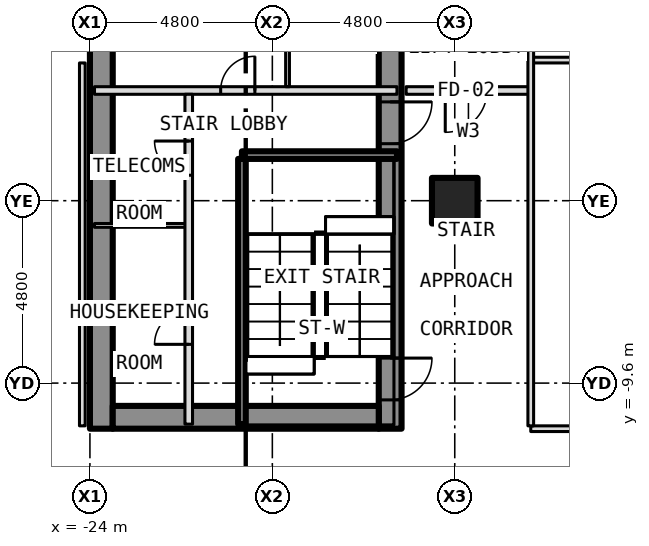
"""IFC4 building model, lengths in metres.
Left out: names, types, materials, properties, quantities, classifications, styles, units other than length and angle.
Written with IfcOpenShell. Run it as: python <this file> out.ifc"""

import sys

from ifc_helpers import new_model, si_unit, direction, frame, frame_2d, origin, origin_2d, place, context, subcontext, project, spatial, rectangle, hollow_rectangle, extrude, element, fill, save


model = new_model("IFC4")
c1 = context("Model", 3, precision=1e-05, world=origin(), true_north=direction((0.0, 1.0)))
c2 = subcontext(c1, "Body", "Model", "MODEL_VIEW")
j1 = project(units=[si_unit("LENGTHUNIT", "METRE"), si_unit("PLANEANGLEUNIT", "RADIAN")], contexts=[c1])
p1 = place(None, origin())
s1 = spatial("IfcSite", under=j1, at=p1, CompositionType="ELEMENT")
p2 = place(p1, origin())
s2 = spatial("IfcBuilding", under=s1, at=p2, CompositionType="ELEMENT")
p3 = place(p2, frame((0.0, 0.0, -10.0)))
s3 = spatial("IfcBuildingStorey", under=s2, at=p3, CompositionType="ELEMENT", Elevation=-10.0)
p4 = place(p3, frame((-14.4, -4.8, -0.6), z_axis=(0.0, 0.0, 1.0), x_axis=(1.0, 0.0, 0.0)))
e1 = element("IfcColumn", 1, at=p4, inside=s3, PredefinedType="COLUMN", context=c2, shape_type="SweptSolid", body=[
    extrude(hollow_rectangle(XDim=1.2, YDim=1.2, WallThickness=0.07, at=origin_2d()), origin(), (0.0, 0.0, 1.0), 5.3),
])
p5 = place(p3, frame((-16.1, -10.8, 0.0), z_axis=(0.0, 0.0, 1.0), x_axis=(0.0, 1.0, 0.0)))
e2 = element("IfcWall", 2, at=p5, inside=s3, PredefinedType="SHEAR", context=c2, shape_type="SweptSolid", body=[
    extrude(rectangle(XDim=21.6, YDim=0.6, at=frame_2d((10.8, 0.0))), origin(), (0.0, 0.0, 1.0), 4.7),
])
p6 = place(p5, frame((11.5, 0.0, 0.0)))
e3 = element("IfcOpeningElement", 3, at=p6, cuts=e2, PredefinedType="OPENING", context=c2, shape_type="SweptSolid", body=[
    extrude(rectangle(XDim=1.1, YDim=2.1, at=frame_2d((0.55, 1.05))), frame((0.0, 0.312, 0.0), z_axis=(0.0, -1.0, 0.0), x_axis=(1.0, 0.0, 0.0)), (0.0, 0.0, 1.0), 0.624),
])
p7 = place(p5, frame((0.758, 0.0, 0.0)))
e4 = element("IfcOpeningElement", 4, at=p7, cuts=e2, PredefinedType="OPENING", context=c2, shape_type="SweptSolid", body=[
    extrude(rectangle(XDim=1.1, YDim=2.1, at=frame_2d((0.55, 1.05))), frame((0.0, 0.312, 0.0), z_axis=(0.0, -1.0, 0.0), x_axis=(1.0, 0.0, 0.0)), (0.0, 0.0, 1.0), 0.624),
])
p8 = place(p5, frame((7.5, 0.0, 0.0)))
e5 = element("IfcOpeningElement", 5, at=p8, cuts=e2, PredefinedType="OPENING", context=c2, shape_type="SweptSolid", body=[
    extrude(rectangle(XDim=1.1, YDim=2.1, at=frame_2d((0.55, 1.05))), frame((0.0, 0.312, 0.0), z_axis=(0.0, -1.0, 0.0), x_axis=(1.0, 0.0, 0.0)), (0.0, 0.0, 1.0), 0.624),
])
p9 = place(p3, frame((-23.7, -10.8, 0.0), z_axis=(0.0, 0.0, 1.0), x_axis=(0.0, 1.0, 0.0)))
e6 = element("IfcWall", 6, at=p9, inside=s3, PredefinedType="SHEAR", context=c2, shape_type="SweptSolid", body=[
    extrude(rectangle(XDim=21.6, YDim=0.6, at=frame_2d((10.8, 0.0))), origin(), (0.0, 0.0, 1.0), 4.7),
])
p10 = place(p3, frame((-23.4, -10.5, 0.0), z_axis=(0.0, 0.0, 1.0), x_axis=(1.0, 0.0, 0.0)))
e7 = element("IfcWall", 7, at=p10, inside=s3, PredefinedType="SHEAR", context=c2, shape_type="SweptSolid", body=[
    extrude(rectangle(XDim=7.0, YDim=0.6, at=frame_2d((3.5, 0.0))), origin(), (0.0, 0.0, 1.0), 4.7),
])
p11 = place(p3, frame((-12.4, -10.8, 0.0), z_axis=(0.0, 0.0, 1.0), x_axis=(1.0, 0.0, 0.0)))
e8 = element("IfcWall", 8, at=p11, inside=s3, PredefinedType="PARTITIONING", context=c2, shape_type="SweptSolid", body=[
    extrude(rectangle(XDim=24.8, YDim=0.15, at=frame_2d((12.4, 0.0))), origin(), (0.0, 0.0, 1.0), 4.7),
])
p12 = place(p11, frame((5.75, 0.0, 0.0)))
e9 = element("IfcOpeningElement", 9, at=p12, cuts=e8, PredefinedType="OPENING", context=c2, shape_type="SweptSolid", body=[
    extrude(rectangle(XDim=0.9, YDim=2.1, at=frame_2d((0.45, 1.05))), frame((0.0, 0.087, 0.0), z_axis=(0.0, -1.0, 0.0), x_axis=(1.0, 0.0, 0.0)), (0.0, 0.0, 1.0), 0.174),
])
p13 = place(p11, frame((18.15, 0.0, 0.0)))
e10 = element("IfcOpeningElement", 10, at=p13, cuts=e8, PredefinedType="OPENING", context=c2, shape_type="SweptSolid", body=[
    extrude(rectangle(XDim=0.9, YDim=2.1, at=frame_2d((0.45, 1.05))), frame((0.0, 0.087, 0.0), z_axis=(0.0, -1.0, 0.0), x_axis=(1.0, 0.0, 0.0)), (0.0, 0.0, 1.0), 0.174),
])
p14 = place(p3, frame((-23.88, -5.45, 0.0), z_axis=(0.0, 0.0, 1.0), x_axis=(1.0, 0.0, 0.0)))
e11 = element("IfcWall", 11, at=p14, inside=s3, PredefinedType="PARTITIONING", context=c2, shape_type="SweptSolid", body=[
    extrude(rectangle(XDim=2.48, YDim=0.1, at=frame_2d((1.24, 0.0))), origin(), (0.0, 0.0, 1.0), 4.7),
])
p15 = place(p3, frame((-20.0, -3.6, 0.0), z_axis=(0.0, 0.0, 1.0), x_axis=(1.0, 0.0, 0.0)))
e12 = element("IfcWall", 12, at=p15, inside=s3, PredefinedType="SHEAR", context=c2, shape_type="SweptSolid", body=[
    extrude(rectangle(XDim=4.08, YDim=0.2, at=frame_2d((2.04, 0.0))), origin(), (0.0, 0.0, 1.0), 4.7),
])
p16 = place(p3, frame((-23.88, -1.9, 0.0), z_axis=(0.0, 0.0, 1.0), x_axis=(1.0, 0.0, 0.0)))
e13 = element("IfcWall", 13, at=p16, inside=s3, PredefinedType="PARTITIONING", context=c2, shape_type="SweptSolid", body=[
    extrude(rectangle(XDim=7.96, YDim=0.2, at=frame_2d((3.98, 0.0))), origin(), (0.0, 0.0, 1.0), 4.7),
])
p17 = place(p16, frame((3.32, 0.0, 0.0)))
e14 = element("IfcOpeningElement", 14, at=p17, cuts=e13, PredefinedType="OPENING", context=c2, shape_type="SweptSolid", body=[
    extrude(rectangle(XDim=0.9, YDim=2.1, at=frame_2d((0.45, 1.05))), frame((0.0, 0.112, 0.0), z_axis=(0.0, -1.0, 0.0), x_axis=(1.0, 0.0, 0.0)), (0.0, 0.0, 1.0), 0.224),
])
p18 = place(p3, frame((-15.68, -1.9, 0.0), z_axis=(0.0, 0.0, 1.0), x_axis=(1.0, 0.0, 0.0)))
e15 = element("IfcWall", 15, at=p18, inside=s3, PredefinedType="PARTITIONING", context=c2, shape_type="SweptSolid", body=[
    extrude(rectangle(XDim=3.28, YDim=0.2, at=frame_2d((1.64, 0.0))), origin(), (0.0, 0.0, 1.0), 4.7),
])
p19 = place(p18, frame((1.03, 0.0, 0.0)))
e16 = element("IfcOpeningElement", 16, at=p19, cuts=e15, PredefinedType="OPENING", context=c2, shape_type="SweptSolid", body=[
    extrude(rectangle(XDim=1.1, YDim=2.1, at=frame_2d((0.55, 1.05))), frame((0.0, 0.112, 0.0), z_axis=(0.0, -1.0, 0.0), x_axis=(1.0, 0.0, 0.0)), (0.0, 0.0, 1.0), 0.224),
])
p20 = place(p3, frame((-12.4, -1.1, 0.0), z_axis=(0.0, 0.0, 1.0), x_axis=(1.0, 0.0, 0.0)))
e17 = element("IfcWall", 17, at=p20, inside=s3, PredefinedType="PARTITIONING", context=c2, shape_type="SweptSolid", body=[
    extrude(rectangle(XDim=24.8, YDim=0.15, at=frame_2d((12.4, 0.0))), origin(), (0.0, 0.0, 1.0), 4.7),
])
p21 = place(p3, frame((-24.2, -10.725, 0.0), z_axis=(0.0, 0.0, 1.0), x_axis=(0.0, 1.0, 0.0)))
e18 = element("IfcWall", 18, at=p21, inside=s3, PredefinedType="PARTITIONING", context=c2, shape_type="SweptSolid", body=[
    extrude(rectangle(XDim=9.55, YDim=0.15, at=frame_2d((4.775, 0.0))), origin(), (0.0, 0.0, 1.0), 4.7),
])
p22 = place(p3, frame((-21.4, -10.68, 0.0), z_axis=(0.0, 0.0, 1.0), x_axis=(0.0, 1.0, 0.0)))
e19 = element("IfcWall", 19, at=p22, inside=s3, PredefinedType="PARTITIONING", context=c2, shape_type="SweptSolid", body=[
    extrude(rectangle(XDim=8.68, YDim=0.2, at=frame_2d((4.34, 0.0))), origin(), (0.0, 0.0, 1.0), 4.7),
])
p23 = place(p22, frame((2.1, 0.0, 0.0)))
e20 = element("IfcOpeningElement", 20, at=p23, cuts=e19, PredefinedType="OPENING", context=c2, shape_type="SweptSolid", body=[
    extrude(rectangle(XDim=0.9, YDim=2.1, at=frame_2d((0.45, 1.05))), frame((0.0, 0.112, 0.0), z_axis=(0.0, -1.0, 0.0), x_axis=(1.0, 0.0, 0.0)), (0.0, 0.0, 1.0), 0.224),
])
p24 = place(p22, frame((6.55, 0.0, 0.0)))
e21 = element("IfcOpeningElement", 21, at=p24, cuts=e19, PredefinedType="OPENING", context=c2, shape_type="SweptSolid", body=[
    extrude(rectangle(XDim=0.9, YDim=2.1, at=frame_2d((0.45, 1.05))), frame((0.0, 0.112, 0.0), z_axis=(0.0, -1.0, 0.0), x_axis=(1.0, 0.0, 0.0)), (0.0, 0.0, 1.0), 0.224),
])
p25 = place(p3, frame((-20.0, -10.68, 0.0), z_axis=(0.0, 0.0, 1.0), x_axis=(0.0, 1.0, 0.0)))
e22 = element("IfcWall", 22, at=p25, inside=s3, PredefinedType="SHEAR", context=c2, shape_type="SweptSolid", body=[
    extrude(rectangle(XDim=6.98, YDim=0.2, at=frame_2d((3.49, 0.0))), origin(), (0.0, 0.0, 1.0), 4.7),
])
p26 = place(p3, frame((-18.8, -1.8, 0.0), z_axis=(0.0, 0.0, 1.0), x_axis=(0.0, 1.0, 0.0)))
e23 = element("IfcWall", 23, at=p26, inside=s3, PredefinedType="PARTITIONING", context=c2, shape_type="SweptSolid", body=[
    extrude(rectangle(XDim=12.48, YDim=0.1, at=frame_2d((6.24, 0.0))), origin(), (0.0, 0.0, 1.0), 4.7),
])
p27 = place(p3, frame((-12.4, -10.725, 0.0), z_axis=(0.0, 0.0, 1.0), x_axis=(0.0, 1.0, 0.0)))
e24 = element("IfcWall", 24, at=p27, inside=s3, PredefinedType="PARTITIONING", context=c2, shape_type="SweptSolid", body=[
    extrude(rectangle(XDim=12.925, YDim=0.15, at=frame_2d((6.462, 0.0))), origin(), (0.0, 0.0, 1.0), 4.7),
])
p28 = place(p27, frame((10.175, 0.0, 0.0)))
e25 = element("IfcOpeningElement", 25, at=p28, cuts=e24, PredefinedType="OPENING", context=c2, shape_type="SweptSolid", body=[
    extrude(rectangle(XDim=1.1, YDim=2.1, at=frame_2d((0.55, 1.05))), frame((0.0, 0.087, 0.0), z_axis=(0.0, -1.0, 0.0), x_axis=(1.0, 0.0, 0.0)), (0.0, 0.0, 1.0), 0.174),
])
p29 = place(p7, origin())
e26 = element("IfcDoor", 26, at=p29, inside=s3, OperationType="SINGLE_SWING_RIGHT", PredefinedType="DOOR", context=c2, shape_type="SweptSolid", body=[
    extrude(rectangle(XDim=1.1, YDim=2.1, at=frame_2d((0.55, 1.05))), frame((0.0, 0.025, 0.0), z_axis=(0.0, -1.0, 0.0), x_axis=(1.0, 0.0, 0.0)), (0.0, 0.0, 1.0), 0.05),
])
fill(e4, e26)
p30 = place(p8, origin())
e27 = element("IfcDoor", 27, at=p30, inside=s3, OperationType="SINGLE_SWING_RIGHT", PredefinedType="DOOR", context=c2, shape_type="SweptSolid", body=[
    extrude(rectangle(XDim=1.1, YDim=2.1, at=frame_2d((0.55, 1.05))), frame((0.0, 0.025, 0.0), z_axis=(0.0, -1.0, 0.0), x_axis=(1.0, 0.0, 0.0)), (0.0, 0.0, 1.0), 0.05),
])
fill(e5, e27)
p31 = place(p23, origin())
e28 = element("IfcDoor", 28, at=p31, inside=s3, OperationType="SINGLE_SWING_LEFT", PredefinedType="DOOR", context=c2, shape_type="SweptSolid", body=[
    extrude(rectangle(XDim=0.9, YDim=2.1, at=frame_2d((0.45, 1.05))), frame((0.0, 0.025, 0.0), z_axis=(0.0, -1.0, 0.0), x_axis=(1.0, 0.0, 0.0)), (0.0, 0.0, 1.0), 0.05),
])
fill(e20, e28)
p32 = place(p24, origin())
e29 = element("IfcDoor", 29, at=p32, inside=s3, OperationType="SINGLE_SWING_RIGHT", PredefinedType="DOOR", context=c2, shape_type="SweptSolid", body=[
    extrude(rectangle(XDim=0.9, YDim=2.1, at=frame_2d((0.45, 1.05))), frame((0.0, 0.025, 0.0), z_axis=(0.0, -1.0, 0.0), x_axis=(1.0, 0.0, 0.0)), (0.0, 0.0, 1.0), 0.05),
])
fill(e21, e29)
p33 = place(p17, origin())
e30 = element("IfcDoor", 30, at=p33, inside=s3, OperationType="SINGLE_SWING_RIGHT", PredefinedType="DOOR", context=c2, shape_type="SweptSolid", body=[
    extrude(rectangle(XDim=0.9, YDim=2.1, at=frame_2d((0.45, 1.05))), frame((0.0, 0.025, 0.0), z_axis=(0.0, -1.0, 0.0), x_axis=(1.0, 0.0, 0.0)), (0.0, 0.0, 1.0), 0.05),
])
fill(e14, e30)
p34 = place(p19, origin())
e31 = element("IfcDoor", 31, at=p34, inside=s3, OperationType="SINGLE_SWING_LEFT", PredefinedType="DOOR", context=c2, shape_type="SweptSolid", body=[
    extrude(rectangle(XDim=1.1, YDim=2.1, at=frame_2d((0.55, 1.05))), frame((0.0, 0.025, 0.0), z_axis=(0.0, -1.0, 0.0), x_axis=(1.0, 0.0, 0.0)), (0.0, 0.0, 1.0), 0.05),
])
fill(e16, e31)
save(model, sys.argv[1])
